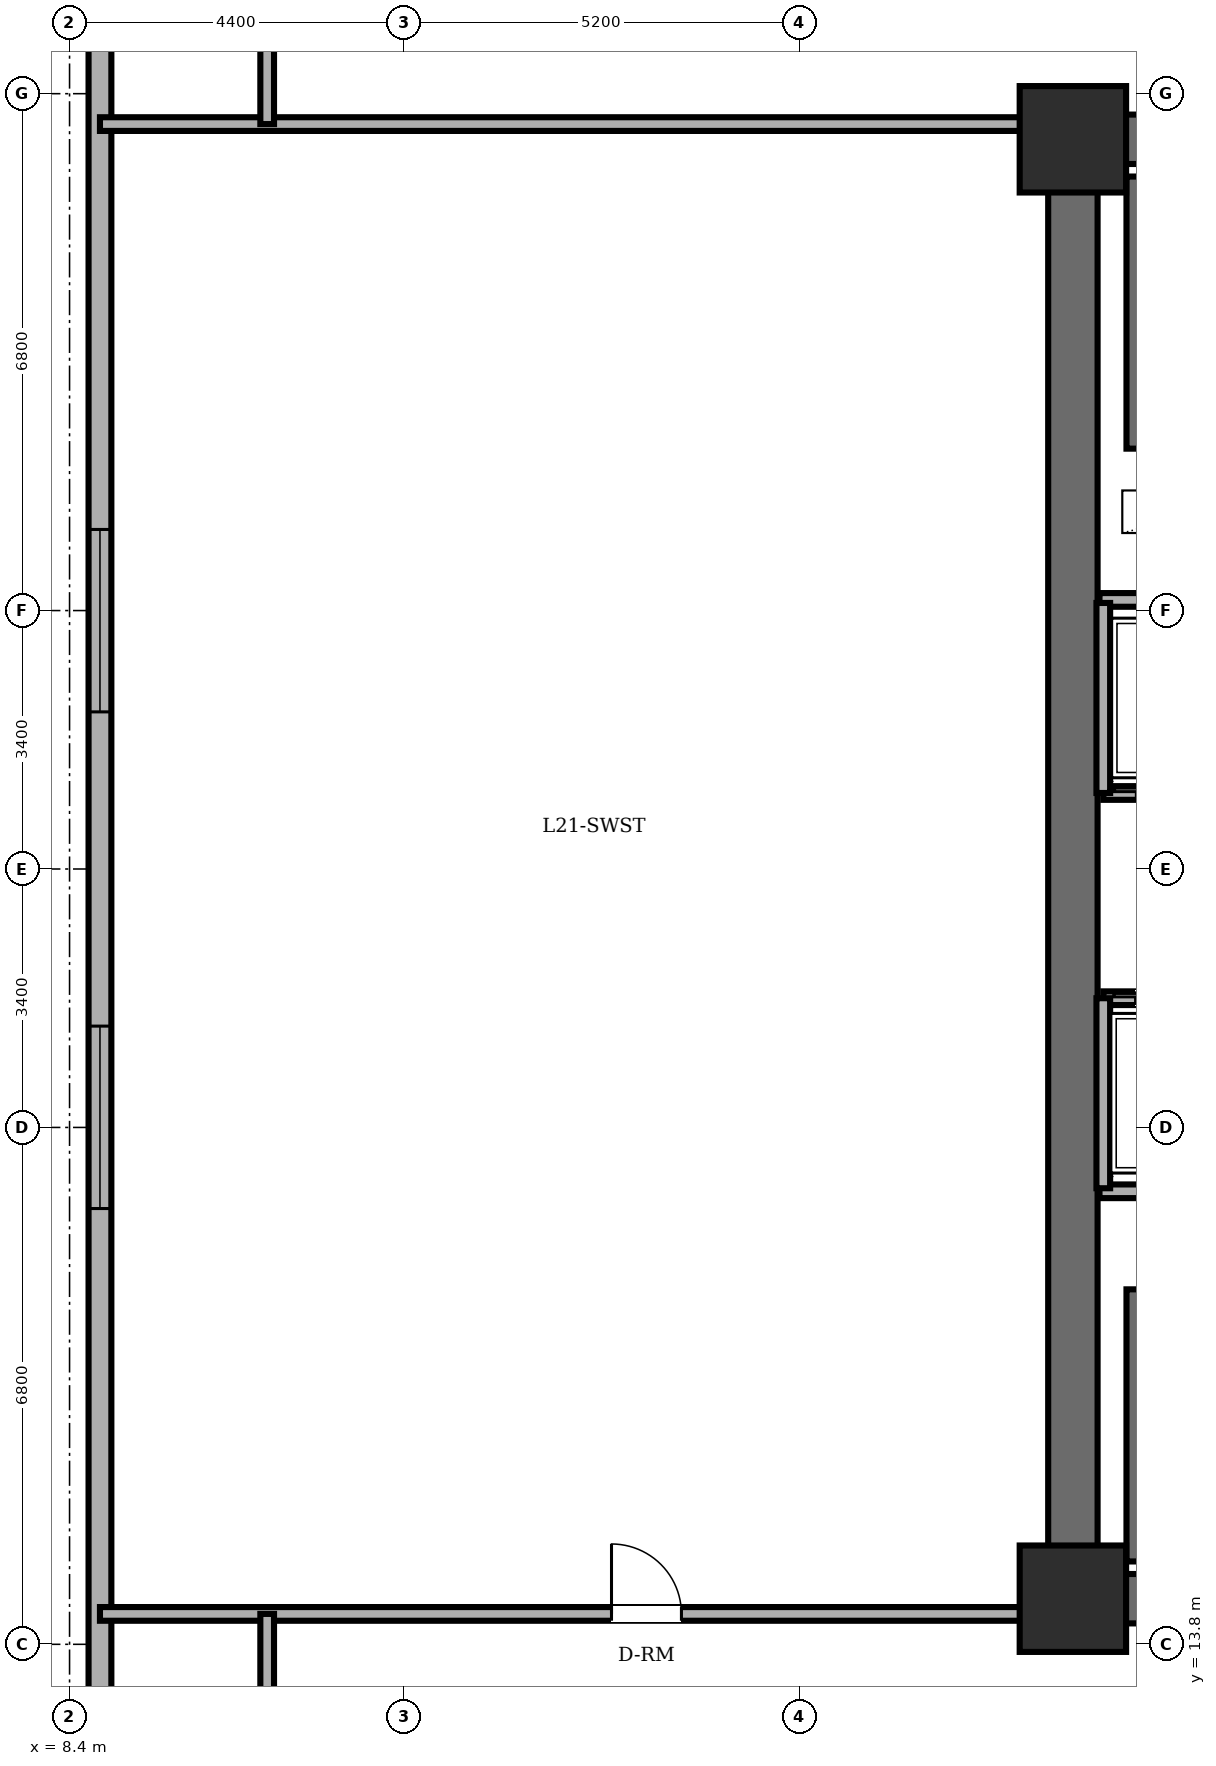
"""IFC4 building model, lengths in metres.
Left out: names, types, materials, properties, quantities, classifications, styles, units other than length and angle.
Written with IfcOpenShell. Run it as: python <this file> out.ifc"""

import sys

from ifc_helpers import new_model, si_unit, direction, frame, frame_2d, origin, origin_2d, place, context, subcontext, project, spatial, rectangle, extrude, element, fill, save


model = new_model("IFC4")
c1 = context("Model", 3, precision=1e-05, world=origin(), true_north=direction((0.0, 1.0)))
c2 = subcontext(c1, "Body", "Model", "MODEL_VIEW")
j1 = project(units=[si_unit("LENGTHUNIT", "METRE"), si_unit("PLANEANGLEUNIT", "RADIAN")], contexts=[c1])
p1 = place(None, origin())
s1 = spatial("IfcSite", under=j1, at=p1, CompositionType="ELEMENT")
p2 = place(p1, origin())
s2 = spatial("IfcBuilding", under=s1, at=p2, CompositionType="ELEMENT")
p3 = place(p2, frame((0.0, 0.0, 81.2)))
s3 = spatial("IfcBuildingStorey", under=s2, at=p3, CompositionType="ELEMENT", Elevation=81.2)
for number, where, z_axis, x_axis in (
    (1, (21.6, 14.4, 0.0), (0.0, 0.0, 1.0), (1.0, 0.0, 0.0)),
    (2, (21.6, 33.6, 0.0), (0.0, 0.0, 1.0), (1.0, 0.0, 0.0)),
):
    element("IfcColumn", number, at=place(p3, frame(where, z_axis=z_axis, x_axis=x_axis)), inside=s3, PredefinedType="COLUMN", context=c2, shape_type="SweptSolid", body=[
        extrude(rectangle(XDim=1.4, YDim=1.4, at=origin_2d()), origin(), (0.0, 0.0, 1.0), 5.1),
    ])
p4 = place(p3, frame((8.8, 38.2, 0.0), z_axis=(0.0, 0.0, 1.0), x_axis=(0.0, -1.0, 0.0)))
e3 = element("IfcWall", 3, at=p4, inside=s3, PredefinedType="SOLIDWALL", context=c2, shape_type="SweptSolid", body=[
    extrude(rectangle(XDim=28.4, YDim=0.3, at=frame_2d((14.2, 0.0))), origin(), (0.0, 0.0, 1.0), 4.9),
])
p5 = place(p4, frame((9.733, 0.0, 0.85)))
e4 = element("IfcOpeningElement", 4, at=p5, cuts=e3, PredefinedType="OPENING", context=c2, shape_type="SweptSolid", body=[
    extrude(rectangle(XDim=2.4, YDim=2.1, at=frame_2d((1.2, 1.05))), frame((0.0, 0.16, 0.0), z_axis=(0.0, -1.0, 0.0), x_axis=(1.0, 0.0, 0.0)), (0.0, 0.0, 1.0), 0.32),
])
p6 = place(p4, frame((16.267, 0.0, 0.85)))
e5 = element("IfcOpeningElement", 5, at=p6, cuts=e3, PredefinedType="OPENING", context=c2, shape_type="SweptSolid", body=[
    extrude(rectangle(XDim=2.4, YDim=2.1, at=frame_2d((1.2, 1.05))), frame((0.0, 0.16, 0.0), z_axis=(0.0, -1.0, 0.0), x_axis=(1.0, 0.0, 0.0)), (0.0, 0.0, 1.0), 0.32),
])
p7 = place(p3, frame((21.6, 14.4, 0.0), z_axis=(0.0, 0.0, 1.0), x_axis=(0.0, 1.0, 0.0)))
e6 = element("IfcWall", 6, at=p7, inside=s3, PredefinedType="SHEAR", context=c2, shape_type="SweptSolid", body=[
    extrude(rectangle(XDim=19.2, YDim=0.65, at=frame_2d((9.6, 0.0))), origin(), (0.0, 0.0, 1.0), 4.9),
])
for number, where, z_axis, x_axis in (
    (7, (21.6, 33.6, 0.0), (0.0, 0.0, 1.0), (1.0, 0.0, 0.0)),
    (8, (37.2, 14.4, 0.0), (0.0, 0.0, 1.0), (-1.0, 0.0, 0.0)),
):
    element("IfcWall", number, at=place(p3, frame(where, z_axis=z_axis, x_axis=x_axis)), inside=s3, PredefinedType="SHEAR", context=c2, shape_type="SweptSolid", body=[
        extrude(rectangle(XDim=15.6, YDim=0.65, at=frame_2d((7.8, 0.0))), origin(), (0.0, 0.0, 1.0), 4.9),
    ])
for number, where, z_axis, x_axis in (
    (9, (22.48, 29.53, 0.0), (0.0, 0.0, 1.0), (0.0, 1.0, 0.0)),
    (10, (22.48, 14.89, 0.0), (0.0, 0.0, 1.0), (0.0, 1.0, 0.0)),
):
    element("IfcWall", number, at=place(p3, frame(where, z_axis=z_axis, x_axis=x_axis)), inside=s3, PredefinedType="SOLIDWALL", context=c2, shape_type="SweptSolid", body=[
        extrude(rectangle(XDim=3.58, YDim=0.35, at=frame_2d((1.79, 0.0))), origin(), (0.0, 0.0, 1.0), 4.9),
    ])
p8 = place(p3, frame((21.95, 27.54, 0.0), z_axis=(0.0, 0.0, 1.0), x_axis=(1.0, 0.0, 0.0)))
e11 = element("IfcWall", 11, at=p8, inside=s3, PredefinedType="PARTITIONING", context=c2, shape_type="SweptSolid", body=[
    extrude(rectangle(XDim=10.56, YDim=0.18, at=frame_2d((5.28, 0.0))), origin(), (0.0, 0.0, 1.0), 4.9),
])
p9 = place(p3, frame((21.95, 19.76, 0.0), z_axis=(0.0, 0.0, 1.0), x_axis=(1.0, 0.0, 0.0)))
e12 = element("IfcWall", 12, at=p9, inside=s3, PredefinedType="PARTITIONING", context=c2, shape_type="SweptSolid", body=[
    extrude(rectangle(XDim=14.87, YDim=0.18, at=frame_2d((7.435, 0.0))), origin(), (0.0, 0.0, 1.0), 4.9),
])
p10 = place(p3, frame((24.02, 25.0, 0.0), z_axis=(0.0, 0.0, 1.0), x_axis=(-1.0, 0.0, 0.0)))
e13 = element("IfcWall", 13, at=p10, inside=s3, PredefinedType="PARTITIONING", context=c2, shape_type="SweptSolid", body=[
    extrude(rectangle(XDim=2.02, YDim=0.18, at=frame_2d((1.01, 0.0))), origin(), (0.0, 0.0, 1.0), 4.9),
])
p11 = place(p10, frame((0.435, 0.0, 0.0)))
e14 = element("IfcOpeningElement", 14, at=p11, cuts=e13, PredefinedType="OPENING", context=c2, shape_type="SweptSolid", body=[
    extrude(rectangle(XDim=1.15, YDim=2.2, at=frame_2d((0.575, 1.1))), frame((0.0, 0.1, 0.0), z_axis=(0.0, -1.0, 0.0), x_axis=(1.0, 0.0, 0.0)), (0.0, 0.0, 1.0), 0.2),
])
p12 = place(p3, frame((22.0, 27.5, 0.0), z_axis=(0.0, 0.0, 1.0), x_axis=(0.0, -1.0, 0.0)))
e15 = element("IfcWall", 15, at=p12, inside=s3, PredefinedType="PARTITIONING", context=c2, shape_type="SweptSolid", body=[
    extrude(rectangle(XDim=2.5, YDim=0.18, at=frame_2d((1.25, 0.0))), origin(), (0.0, 0.0, 1.0), 4.9),
])
p13 = place(p3, frame((22.0, 22.3, 0.0), z_axis=(0.0, 0.0, 1.0), x_axis=(1.0, 0.0, 0.0)))
e16 = element("IfcWall", 16, at=p13, inside=s3, PredefinedType="PARTITIONING", context=c2, shape_type="SweptSolid", body=[
    extrude(rectangle(XDim=2.0, YDim=0.18, at=frame_2d((1.0, 0.0))), origin(), (0.0, 0.0, 1.0), 4.9),
])
p14 = place(p13, frame((0.425, 0.0, 0.0)))
e17 = element("IfcOpeningElement", 17, at=p14, cuts=e16, PredefinedType="OPENING", context=c2, shape_type="SweptSolid", body=[
    extrude(rectangle(XDim=1.15, YDim=2.2, at=frame_2d((0.575, 1.1))), frame((0.0, 0.1, 0.0), z_axis=(0.0, -1.0, 0.0), x_axis=(1.0, 0.0, 0.0)), (0.0, 0.0, 1.0), 0.2),
])
p15 = place(p3, frame((22.0, 22.3, 0.0), z_axis=(0.0, 0.0, 1.0), x_axis=(0.0, -1.0, 0.0)))
e18 = element("IfcWall", 18, at=p15, inside=s3, PredefinedType="PARTITIONING", context=c2, shape_type="SweptSolid", body=[
    extrude(rectangle(XDim=2.5, YDim=0.18, at=frame_2d((1.25, 0.0))), origin(), (0.0, 0.0, 1.0), 4.9),
])
p16 = place(p3, frame((8.8, 14.2, 0.0), z_axis=(0.0, 0.0, 1.0), x_axis=(1.0, 0.0, 0.0)))
e19 = element("IfcWall", 19, at=p16, inside=s3, PredefinedType="PARTITIONING", context=c2, shape_type="SweptSolid", body=[
    extrude(rectangle(XDim=12.7, YDim=0.18, at=frame_2d((6.35, 0.0))), origin(), (0.0, 0.0, 1.0), 4.9),
])
p17 = place(p16, frame((6.73, 0.0, 0.0)))
e20 = element("IfcOpeningElement", 20, at=p17, cuts=e19, PredefinedType="OPENING", context=c2, shape_type="SweptSolid", body=[
    extrude(rectangle(XDim=0.92, YDim=2.1, at=frame_2d((0.46, 1.05))), frame((0.0, 0.1, 0.0), z_axis=(0.0, -1.0, 0.0), x_axis=(1.0, 0.0, 0.0)), (0.0, 0.0, 1.0), 0.2),
])
p18 = place(p3, frame((8.8, 33.8, 0.0), z_axis=(0.0, 0.0, 1.0), x_axis=(1.0, 0.0, 0.0)))
e21 = element("IfcWall", 21, at=p18, inside=s3, PredefinedType="PARTITIONING", context=c2, shape_type="SweptSolid", body=[
    extrude(rectangle(XDim=12.7, YDim=0.18, at=frame_2d((6.35, 0.0))), origin(), (0.0, 0.0, 1.0), 4.9),
])
for number, where, z_axis, x_axis in (
    (22, (11.0, 11.8, 0.0), (0.0, 0.0, 1.0), (0.0, 1.0, 0.0)),
    (23, (11.0, 33.8, 0.0), (0.0, 0.0, 1.0), (0.0, 1.0, 0.0)),
):
    element("IfcWall", number, at=place(p3, frame(where, z_axis=z_axis, x_axis=x_axis)), inside=s3, PredefinedType="PARTITIONING", context=c2, shape_type="SweptSolid", body=[
        extrude(rectangle(XDim=2.4, YDim=0.18, at=frame_2d((1.2, 0.0))), origin(), (0.0, 0.0, 1.0), 4.382),
    ])
p19 = place(p5, origin())
e24 = element("IfcWindow", 24, at=p19, inside=s3, PartitioningType="TRIPLE_PANEL_VERTICAL", PredefinedType="WINDOW", context=c2, shape_type="SweptSolid", body=[
    extrude(rectangle(XDim=2.4, YDim=2.1, at=frame_2d((1.2, 1.05))), frame((0.0, 0.03, 0.0), z_axis=(0.0, -1.0, 0.0), x_axis=(1.0, 0.0, 0.0)), (0.0, 0.0, 1.0), 0.06),
])
fill(e4, e24)
p20 = place(p6, origin())
e25 = element("IfcWindow", 25, at=p20, inside=s3, PartitioningType="TRIPLE_PANEL_VERTICAL", PredefinedType="WINDOW", context=c2, shape_type="SweptSolid", body=[
    extrude(rectangle(XDim=2.4, YDim=2.1, at=frame_2d((1.2, 1.05))), frame((0.0, 0.03, 0.0), z_axis=(0.0, -1.0, 0.0), x_axis=(1.0, 0.0, 0.0)), (0.0, 0.0, 1.0), 0.06),
])
fill(e5, e25)
p21 = place(p14, origin())
e26 = element("IfcDoor", 26, at=p21, inside=s3, OperationType="DOUBLE_DOOR_SLIDING", PredefinedType="DOOR", context=c2, shape_type="SweptSolid", body=[
    extrude(rectangle(XDim=1.15, YDim=2.2, at=frame_2d((0.575, 1.1))), frame((0.0, 0.025, 0.0), z_axis=(0.0, -1.0, 0.0), x_axis=(1.0, 0.0, 0.0)), (0.0, 0.0, 1.0), 0.05),
])
fill(e17, e26)
p22 = place(p17, origin())
e27 = element("IfcDoor", 27, at=p22, inside=s3, OperationType="SINGLE_SWING_LEFT", PredefinedType="DOOR", context=c2, shape_type="SweptSolid", body=[
    extrude(rectangle(XDim=0.92, YDim=2.1, at=frame_2d((0.46, 1.05))), frame((0.0, 0.025, 0.0), z_axis=(0.0, -1.0, 0.0), x_axis=(1.0, 0.0, 0.0)), (0.0, 0.0, 1.0), 0.05),
])
fill(e20, e27)
save(model, sys.argv[1])
